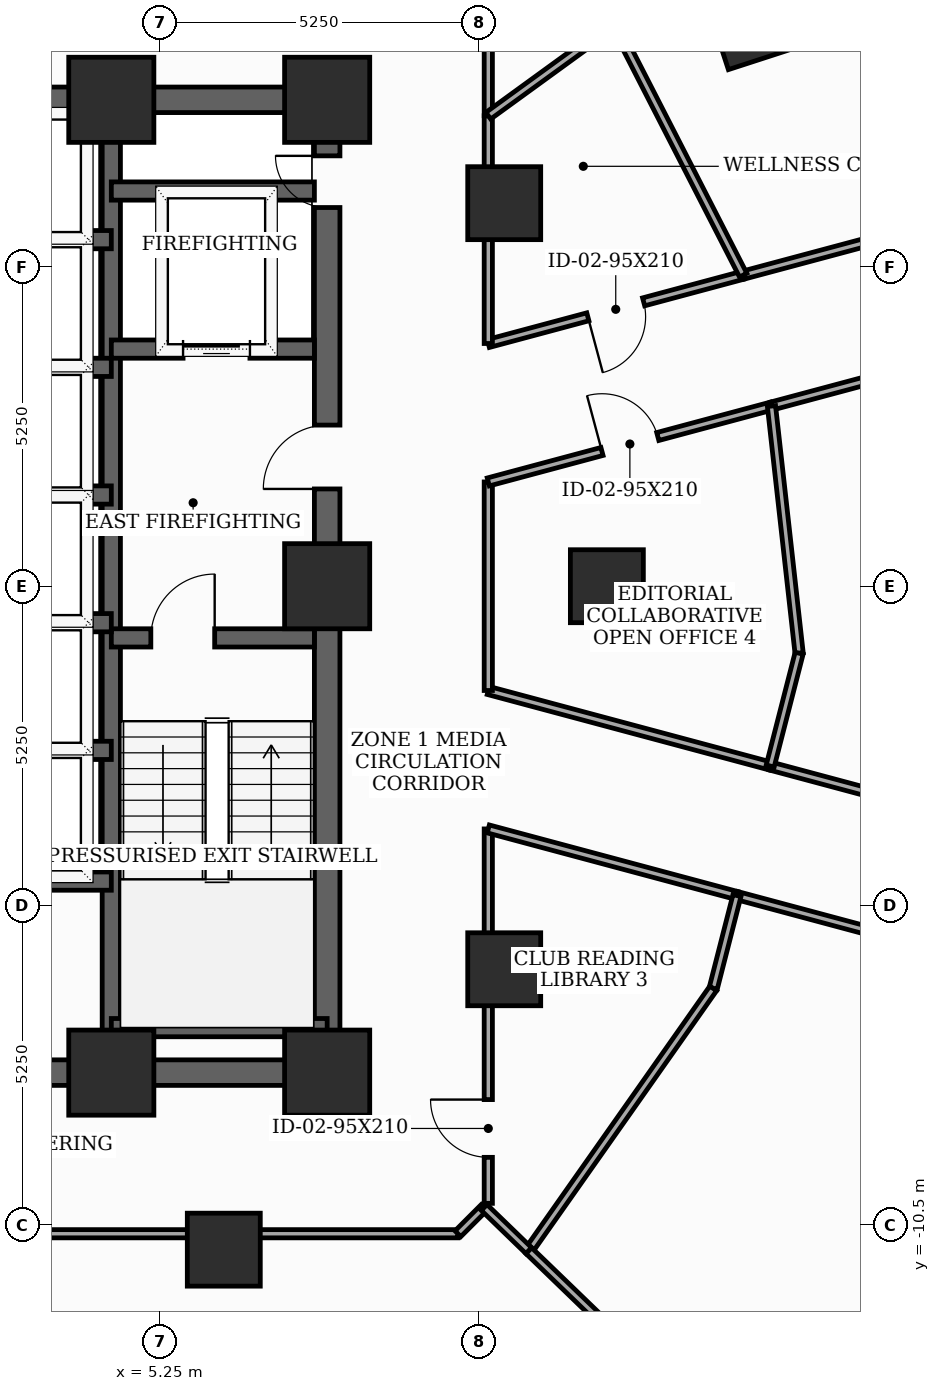
"""IFC4 building model, lengths in metres.
Left out: names, types, materials, properties, quantities, classifications, styles, units other than length and angle.
Written with IfcOpenShell. Run it as: python <this file> out.ifc"""

import sys

from ifc_helpers import new_model, si_unit, direction, frame, frame_2d, origin, origin_2d, place, context, subcontext, project, spatial, rectangle, extrude, element, fill, save


model = new_model("IFC4")
c1 = context("Model", 3, precision=1e-05, world=origin(), true_north=direction((0.0, 1.0)))
c2 = subcontext(c1, "Body", "Model", "MODEL_VIEW")
j1 = project(units=[si_unit("LENGTHUNIT", "METRE"), si_unit("PLANEANGLEUNIT", "RADIAN")], contexts=[c1])
p1 = place(None, origin())
s1 = spatial("IfcSite", under=j1, at=p1, CompositionType="ELEMENT")
p2 = place(p1, origin())
s2 = spatial("IfcBuilding", under=s1, at=p2, CompositionType="ELEMENT")
p3 = place(p2, frame((0.0, 0.0, 108.8)))
s3 = spatial("IfcBuildingStorey", under=s2, at=p3, CompositionType="ELEMENT", Elevation=108.8)
for number, where, z_axis, x_axis in (
    (1, (4.45, -8.0, 0.0), (0.0, 0.0, 1.0), (1.0, 0.0, 0.0)),
    (2, (8.0, -8.0, 0.0), (0.0, 0.0, 1.0), (1.0, 0.0, 0.0)),
    (3, (8.0, 0.0, 0.0), (0.0, 0.0, 1.0), (1.0, 0.0, 0.0)),
    (4, (8.0, 8.0, 0.0), (0.0, 0.0, 1.0), (1.0, 0.0, 0.0)),
    (5, (4.45, 8.0, 0.0), (0.0, 0.0, 1.0), (1.0, 0.0, 0.0)),
):
    element("IfcColumn", number, at=place(p3, frame(where, z_axis=z_axis, x_axis=x_axis)), inside=s3, PredefinedType="COLUMN", context=c2, shape_type="SweptSolid", body=[
        extrude(rectangle(XDim=1.4, YDim=1.4, at=origin_2d()), origin(), (0.0, 0.0, 1.0), 3.7),
    ])
for number, where, z_axis, x_axis in (
    (6, (12.6, 0.0, 0.0), (0.0, 0.0, 1.0), (1.0, 0.0, 0.0)),
    (7, (10.912, 6.3, 0.0), (0.0, 0.0, 1.0), (1.0, 0.0, 0.0)),
    (8, (6.3, -10.912, 0.0), (0.0, 0.0, 1.0), (1.0, 0.0, 0.0)),
    (9, (10.912, -6.3, 0.0), (0.0, 0.0, 1.0), (1.0, 0.0, 0.0)),
    (10, (14.984, 9.252, 0.0), (0.0, 0.0, 1.0), (0.951, 0.309, 0.0)),
):
    element("IfcColumn", number, at=place(p3, frame(where, z_axis=z_axis, x_axis=x_axis)), inside=s3, PredefinedType="COLUMN", context=c2, shape_type="SweptSolid", body=[
        extrude(rectangle(XDim=1.2, YDim=1.2, at=origin_2d()), origin(), (0.0, 0.0, 1.0), 3.7),
    ])
p4 = place(p3, frame((8.0, -8.0, 0.0), z_axis=(0.0, 0.0, 1.0), x_axis=(0.0, 1.0, 0.0)))
e11 = element("IfcWall", 11, at=p4, inside=s3, PredefinedType="SHEAR", context=c2, shape_type="SweptSolid", body=[
    extrude(rectangle(XDim=16.0, YDim=0.42, at=frame_2d((8.0, 0.0))), origin(), (0.0, 0.0, 1.0), 3.5),
])
p5 = place(p4, frame((9.6, 0.0, 0.0)))
e12 = element("IfcOpeningElement", 12, at=p5, cuts=e11, PredefinedType="OPENING", context=c2, shape_type="SweptSolid", body=[
    extrude(rectangle(XDim=1.05, YDim=2.15, at=frame_2d((0.525, 1.075))), frame((0.0, 0.22, 0.0), z_axis=(0.0, -1.0, 0.0), x_axis=(1.0, 0.0, 0.0)), (0.0, 0.0, 1.0), 0.44),
])
p6 = place(p4, frame((14.229, 0.0, 0.0)))
e13 = element("IfcOpeningElement", 13, at=p6, cuts=e11, PredefinedType="OPENING", context=c2, shape_type="SweptSolid", body=[
    extrude(rectangle(XDim=0.85, YDim=2.02, at=frame_2d((0.425, 1.01))), frame((0.0, 0.22, 0.0), z_axis=(0.0, -1.0, 0.0), x_axis=(1.0, 0.0, 0.0)), (0.0, 0.0, 1.0), 0.44),
])
p7 = place(p3, frame((-8.0, -8.0, 0.0), z_axis=(0.0, 0.0, 1.0), x_axis=(1.0, 0.0, 0.0)))
e14 = element("IfcWall", 14, at=p7, inside=s3, PredefinedType="SHEAR", context=c2, shape_type="SweptSolid", body=[
    extrude(rectangle(XDim=16.0, YDim=0.42, at=frame_2d((8.0, 0.0))), origin(), (0.0, 0.0, 1.0), 3.5),
])
p8 = place(p7, frame((4.6, 0.0, 0.0)))
e15 = element("IfcOpeningElement", 15, at=p8, cuts=e14, PredefinedType="OPENING", context=c2, shape_type="SweptSolid", body=[
    extrude(rectangle(XDim=0.95, YDim=2.1, at=frame_2d((0.475, 1.05))), frame((0.0, 0.22, 0.0), z_axis=(0.0, -1.0, 0.0), x_axis=(1.0, 0.0, 0.0)), (0.0, 0.0, 1.0), 0.44),
])
p9 = place(p7, frame((7.52, 0.0, 0.0)))
e16 = element("IfcOpeningElement", 16, at=p9, cuts=e14, PredefinedType="OPENING", context=c2, shape_type="SweptSolid", body=[
    extrude(rectangle(XDim=0.95, YDim=2.1, at=frame_2d((0.475, 1.05))), frame((0.0, 0.22, 0.0), z_axis=(0.0, -1.0, 0.0), x_axis=(1.0, 0.0, 0.0)), (0.0, 0.0, 1.0), 0.44),
])
p10 = place(p7, frame((10.45, 0.0, 0.0)))
e17 = element("IfcOpeningElement", 17, at=p10, cuts=e14, PredefinedType="OPENING", context=c2, shape_type="SweptSolid", body=[
    extrude(rectangle(XDim=0.95, YDim=2.1, at=frame_2d((0.475, 1.05))), frame((0.0, 0.22, 0.0), z_axis=(0.0, -1.0, 0.0), x_axis=(1.0, 0.0, 0.0)), (0.0, 0.0, 1.0), 0.44),
])
p11 = place(p3, frame((-8.0, 8.0, 0.0), z_axis=(0.0, 0.0, 1.0), x_axis=(1.0, 0.0, 0.0)))
e18 = element("IfcWall", 18, at=p11, inside=s3, PredefinedType="SHEAR", context=c2, shape_type="SweptSolid", body=[
    extrude(rectangle(XDim=16.0, YDim=0.42, at=frame_2d((8.0, 0.0))), origin(), (0.0, 0.0, 1.0), 3.5),
])
p12 = place(p11, frame((7.1, 0.0, 0.0)))
e19 = element("IfcOpeningElement", 19, at=p12, cuts=e18, PredefinedType="OPENING", context=c2, shape_type="SweptSolid", body=[
    extrude(rectangle(XDim=1.8, YDim=2.15, at=frame_2d((0.9, 1.075))), frame((0.0, 0.22, 0.0), z_axis=(0.0, -1.0, 0.0), x_axis=(1.0, 0.0, 0.0)), (0.0, 0.0, 1.0), 0.44),
])
p13 = place(p3, frame((4.45, -7.79, 0.0), z_axis=(0.0, 0.0, 1.0), x_axis=(0.0, 1.0, 0.0)))
e20 = element("IfcWall", 20, at=p13, inside=s3, PredefinedType="SHEAR", context=c2, shape_type="SweptSolid", body=[
    extrude(rectangle(XDim=15.58, YDim=0.3, at=frame_2d((7.79, 0.0))), origin(), (0.0, 0.0, 1.0), 3.5),
])
p14 = place(p3, frame((4.45, -0.85, 0.0), z_axis=(0.0, 0.0, 1.0), x_axis=(1.0, 0.0, 0.0)))
e21 = element("IfcWall", 21, at=p14, inside=s3, PredefinedType="SHEAR", context=c2, shape_type="SweptSolid", body=[
    extrude(rectangle(XDim=3.34, YDim=0.3, at=frame_2d((1.67, 0.0))), origin(), (0.0, 0.0, 1.0), 3.5),
])
p15 = place(p14, frame((0.65, 0.0, 0.0)))
e22 = element("IfcOpeningElement", 22, at=p15, cuts=e21, PredefinedType="OPENING", context=c2, shape_type="SweptSolid", body=[
    extrude(rectangle(XDim=1.05, YDim=2.15, at=frame_2d((0.525, 1.075))), frame((0.0, 0.16, 0.0), z_axis=(0.0, -1.0, 0.0), x_axis=(1.0, 0.0, 0.0)), (0.0, 0.0, 1.0), 0.32),
])
p16 = place(p3, frame((4.45, -7.26, 0.0), z_axis=(0.0, 0.0, 1.0), x_axis=(1.0, 0.0, 0.0)))
e23 = element("IfcWall", 23, at=p16, inside=s3, PredefinedType="SHEAR", context=c2, shape_type="SweptSolid", body=[
    extrude(rectangle(XDim=3.55, YDim=0.3, at=frame_2d((1.775, 0.0))), origin(), (0.0, 0.0, 1.0), 3.5),
])
p17 = place(p3, frame((4.45, 3.9, 0.0), z_axis=(0.0, 0.0, 1.0), x_axis=(1.0, 0.0, 0.0)))
e24 = element("IfcWall", 24, at=p17, inside=s3, PredefinedType="SHEAR", context=c2, shape_type="SweptSolid", body=[
    extrude(rectangle(XDim=3.34, YDim=0.3, at=frame_2d((1.67, 0.0))), origin(), (0.0, 0.0, 1.0), 3.5),
])
p18 = place(p17, frame((1.18, 0.0, 0.0)))
e25 = element("IfcOpeningElement", 25, at=p18, cuts=e24, PredefinedType="OPENING", context=c2, shape_type="SweptSolid", body=[
    extrude(rectangle(XDim=1.1, YDim=2.1, at=frame_2d((0.55, 1.05))), frame((0.0, 0.16, 0.0), z_axis=(0.0, -1.0, 0.0), x_axis=(1.0, 0.0, 0.0)), (0.0, 0.0, 1.0), 0.32),
])
p19 = place(p3, frame((4.45, 6.5, 0.0), z_axis=(0.0, 0.0, 1.0), x_axis=(1.0, 0.0, 0.0)))
e26 = element("IfcWall", 26, at=p19, inside=s3, PredefinedType="SHEAR", context=c2, shape_type="SweptSolid", body=[
    extrude(rectangle(XDim=3.34, YDim=0.3, at=frame_2d((1.67, 0.0))), origin(), (0.0, 0.0, 1.0), 3.5),
])
p20 = place(p3, frame((-4.45, -4.85, 0.0), z_axis=(0.0, 0.0, 1.0), x_axis=(1.0, 0.0, 0.0)))
e27 = element("IfcWall", 27, at=p20, inside=s3, PredefinedType="SHEAR", context=c2, shape_type="SweptSolid", body=[
    extrude(rectangle(XDim=8.9, YDim=0.3, at=frame_2d((4.45, 0.0))), origin(), (0.0, 0.0, 1.0), 3.5),
])
for number, where, z_axis, x_axis in (
    (28, (1.68, 1.5, 0.0), (0.0, 0.0, 1.0), (1.0, 0.0, 0.0)),
    (29, (1.68, 3.6, 0.0), (0.0, 0.0, 1.0), (1.0, 0.0, 0.0)),
    (30, (1.68, 5.7, 0.0), (0.0, 0.0, 1.0), (1.0, 0.0, 0.0)),
    (31, (1.68, -2.7, 0.0), (0.0, 0.0, 1.0), (1.0, 0.0, 0.0)),
    (32, (1.68, -0.6, 0.0), (0.0, 0.0, 1.0), (1.0, 0.0, 0.0)),
):
    element("IfcWall", number, at=place(p3, frame(where, z_axis=z_axis, x_axis=x_axis)), inside=s3, PredefinedType="SHEAR", context=c2, shape_type="SweptSolid", body=[
        extrude(rectangle(XDim=2.77, YDim=0.3, at=frame_2d((1.385, 0.0))), origin(), (0.0, 0.0, 1.0), 3.5),
    ])
p21 = place(p3, frame((14.74, -5.088, 0.0), z_axis=(0.0, 0.0, 1.0), x_axis=(0.965895912523, -0.258930659002, 0.0)))
e33 = element("IfcWall", 33, at=p21, inside=s3, PredefinedType="PARTITIONING", context=c2, shape_type="SweptSolid", body=[
    extrude(rectangle(XDim=7.045, YDim=0.135, at=frame_2d((3.522, 0.0))), origin(), (0.0, 0.0, 1.0), 2.935),
])
p22 = place(p3, frame((22.115, -4.787, 0.0), z_axis=(0.0, 0.0, 1.0), x_axis=(-0.965917838763, 0.258848853116, 0.0)))
e34 = element("IfcWall", 34, at=p22, inside=s3, PredefinedType="PARTITIONING", context=c2, shape_type="SweptSolid", body=[
    extrude(rectangle(XDim=7.07, YDim=0.135, at=frame_2d((3.535, 0.0))), origin(), (0.0, 0.0, 1.0), 2.935),
])
p23 = place(p22, frame((3.06, 0.0, 0.0)))
e35 = element("IfcOpeningElement", 35, at=p23, cuts=e34, PredefinedType="OPENING", context=c2, shape_type="SweptSolid", body=[
    extrude(rectangle(XDim=0.95, YDim=2.1, at=frame_2d((0.475, 1.05))), frame((0.0, 0.077, 0.0), z_axis=(0.0, -1.0, 0.0), x_axis=(1.0, 0.0, 0.0)), (0.0, 0.0, 1.0), 0.155),
])
p24 = place(p3, frame((15.307, 2.963, 0.0), z_axis=(0.0, 0.0, 1.0), x_axis=(0.965966165677, 0.258668449501, 0.0)))
e36 = element("IfcWall", 36, at=p24, inside=s3, PredefinedType="PARTITIONING", context=c2, shape_type="SweptSolid", body=[
    extrude(rectangle(XDim=3.248, YDim=0.135, at=frame_2d((1.624, 0.0))), origin(), (0.0, 0.0, 1.0), 3.125),
])
p25 = place(p3, frame((17.875, 5.928, 0.0), z_axis=(0.0, 0.0, 1.0), x_axis=(-0.96597893007, -0.258620777704, 0.0)))
e37 = element("IfcWall", 37, at=p25, inside=s3, PredefinedType="PARTITIONING", context=c2, shape_type="SweptSolid", body=[
    extrude(rectangle(XDim=3.14, YDim=0.135, at=frame_2d((1.57, 0.0))), origin(), (0.0, 0.0, 1.0), 3.125),
])
p26 = place(p3, frame((10.65, -10.15, 0.0), z_axis=(0.0, 0.0, 1.0), x_axis=(0.0, 1.0, 0.0)))
e38 = element("IfcWall", 38, at=p26, inside=s3, PredefinedType="PARTITIONING", context=c2, shape_type="SweptSolid", body=[
    extrude(rectangle(XDim=6.158, YDim=0.135, at=frame_2d((3.079, 0.0))), origin(), (0.0, 0.0, 1.0), 2.785),
])
p27 = place(p26, frame((0.757, 0.0, 0.0)))
e39 = element("IfcOpeningElement", 39, at=p27, cuts=e38, PredefinedType="OPENING", context=c2, shape_type="SweptSolid", body=[
    extrude(rectangle(XDim=0.95, YDim=2.1, at=frame_2d((0.475, 1.05))), frame((0.0, 0.077, 0.0), z_axis=(0.0, -1.0, 0.0), x_axis=(1.0, 0.0, 0.0)), (0.0, 0.0, 1.0), 0.155),
])
p28 = place(p3, frame((10.65, -3.992, 0.0), z_axis=(0.0, 0.0, 1.0), x_axis=(0.965925146235, -0.258821583086, 0.0)))
e40 = element("IfcWall", 40, at=p28, inside=s3, PredefinedType="PARTITIONING", context=c2, shape_type="SweptSolid", body=[
    extrude(rectangle(XDim=4.234, YDim=0.135, at=frame_2d((2.117, 0.0))), origin(), (0.0, 0.0, 1.0), 2.785),
])
p29 = place(p3, frame((15.286, -2.957, 0.0), z_axis=(0.0, 0.0, 1.0), x_axis=(-0.965939651128, 0.258767444588, 0.0)))
e41 = element("IfcWall", 41, at=p29, inside=s3, PredefinedType="PARTITIONING", context=c2, shape_type="SweptSolid", body=[
    extrude(rectangle(XDim=4.8, YDim=0.135, at=frame_2d((2.4, 0.0))), origin(), (0.0, 0.0, 1.0), 2.785),
])
p30 = place(p3, frame((10.65, -1.715, 0.0), z_axis=(0.0, 0.0, 1.0), x_axis=(0.0, 1.0, 0.0)))
e42 = element("IfcWall", 42, at=p30, inside=s3, PredefinedType="PARTITIONING", context=c2, shape_type="SweptSolid", body=[
    extrude(rectangle(XDim=3.43, YDim=0.135, at=frame_2d((1.715, 0.0))), origin(), (0.0, 0.0, 1.0), 2.785),
])
p31 = place(p3, frame((10.65, 1.715, 0.0), z_axis=(0.0, 0.0, 1.0), x_axis=(0.965927482723, 0.258812863129, 0.0)))
e43 = element("IfcWall", 43, at=p31, inside=s3, PredefinedType="PARTITIONING", context=c2, shape_type="SweptSolid", body=[
    extrude(rectangle(XDim=4.821, YDim=0.135, at=frame_2d((2.411, 0.0))), origin(), (0.0, 0.0, 1.0), 2.785),
])
p32 = place(p31, frame((1.936, 0.0, 0.0)))
e44 = element("IfcOpeningElement", 44, at=p32, cuts=e43, PredefinedType="OPENING", context=c2, shape_type="SweptSolid", body=[
    extrude(rectangle(XDim=0.95, YDim=2.1, at=frame_2d((0.475, 1.05))), frame((0.0, 0.077, 0.0), z_axis=(0.0, -1.0, 0.0), x_axis=(1.0, 0.0, 0.0)), (0.0, 0.0, 1.0), 0.155),
])
p33 = place(p3, frame((14.842, 5.116, 0.0), z_axis=(0.0, 0.0, 1.0), x_axis=(-0.965883000332, -0.258978820891, 0.0)))
e45 = element("IfcWall", 45, at=p33, inside=s3, PredefinedType="PARTITIONING", context=c2, shape_type="SweptSolid", body=[
    extrude(rectangle(XDim=4.34, YDim=0.135, at=frame_2d((2.17, 0.0))), origin(), (0.0, 0.0, 1.0), 2.785),
])
p34 = place(p33, frame((1.695, 0.0, 0.0)))
e46 = element("IfcOpeningElement", 46, at=p34, cuts=e45, PredefinedType="OPENING", context=c2, shape_type="SweptSolid", body=[
    extrude(rectangle(XDim=0.95, YDim=2.1, at=frame_2d((0.475, 1.05))), frame((0.0, 0.077, 0.0), z_axis=(0.0, -1.0, 0.0), x_axis=(1.0, 0.0, 0.0)), (0.0, 0.0, 1.0), 0.155),
])
p35 = place(p3, frame((10.65, 3.992, 0.0), z_axis=(0.0, 0.0, 1.0), x_axis=(0.0, 1.0, 0.0)))
e47 = element("IfcWall", 47, at=p35, inside=s3, PredefinedType="PARTITIONING", context=c2, shape_type="SweptSolid", body=[
    extrude(rectangle(XDim=3.746, YDim=0.135, at=frame_2d((1.873, 0.0))), origin(), (0.0, 0.0, 1.0), 2.785),
])
p36 = place(p3, frame((2.264, -10.65, 0.0), z_axis=(0.0, 0.0, 1.0), x_axis=(1.0, 0.0, 0.0)))
e48 = element("IfcWall", 48, at=p36, inside=s3, PredefinedType="PARTITIONING", context=c2, shape_type="SweptSolid", body=[
    extrude(rectangle(XDim=7.886, YDim=0.135, at=frame_2d((3.943, 0.0))), origin(), (0.0, 0.0, 1.0), 2.785),
])
p37 = place(p3, frame((10.15, -10.65, 0.0), z_axis=(0.0, 0.0, 1.0), x_axis=(0.70730655707, 0.706906948845, 0.0)))
e49 = element("IfcWall", 49, at=p37, inside=s3, PredefinedType="PARTITIONING", context=c2, shape_type="SweptSolid", body=[
    extrude(rectangle(XDim=0.611, YDim=0.135, at=frame_2d((0.305, 0.0))), origin(), (0.0, 0.0, 1.0), 3.5),
])
p38 = place(p3, frame((10.65, 7.738, 0.0), z_axis=(0.0, 0.0, 1.0), x_axis=(0.0, 1.0, 0.0)))
e50 = element("IfcWall", 50, at=p38, inside=s3, PredefinedType="PARTITIONING", context=c2, shape_type="SweptSolid", body=[
    extrude(rectangle(XDim=2.412, YDim=0.135, at=frame_2d((1.206, 0.0))), origin(), (0.0, 0.0, 1.0), 3.125),
])
p39 = place(p3, frame((3.778, -17.774, 0.0), z_axis=(0.0, 0.0, 1.0), x_axis=(-0.207917284361, 0.978146411773, 0.0)))
e51 = element("IfcWall", 51, at=p39, inside=s3, PredefinedType="PARTITIONING", context=c2, shape_type="SweptSolid", body=[
    extrude(rectangle(XDim=7.284, YDim=0.115, at=frame_2d((3.642, 0.0))), origin(), (0.0, 0.0, 1.0), 2.785),
])
p40 = place(p39, frame((3.182, 0.0, 0.0)))
e52 = element("IfcOpeningElement", 52, at=p40, cuts=e51, PredefinedType="OPENING", context=c2, shape_type="SweptSolid", body=[
    extrude(rectangle(XDim=0.92, YDim=2.1, at=frame_2d((0.46, 1.05))), frame((0.0, 0.067, 0.0), z_axis=(0.0, -1.0, 0.0), x_axis=(1.0, 0.0, 0.0)), (0.0, 0.0, 1.0), 0.135),
])
p41 = place(p3, frame((14.74, -5.088, 0.0), z_axis=(0.0, 0.0, 1.0), x_axis=(-0.247961711117, -0.968769833252, 0.0)))
e53 = element("IfcWall", 53, at=p41, inside=s3, PredefinedType="PARTITIONING", context=c2, shape_type="SweptSolid", body=[
    extrude(rectangle(XDim=1.576, YDim=0.135, at=frame_2d((0.788, 0.0))), origin(), (0.0, 0.0, 1.0), 3.5),
])
p42 = place(p3, frame((14.349, -6.615, 0.0), z_axis=(0.0, 0.0, 1.0), x_axis=(-0.575468172254, -0.817824175922, 0.0)))
e54 = element("IfcWall", 54, at=p42, inside=s3, PredefinedType="PARTITIONING", context=c2, shape_type="SweptSolid", body=[
    extrude(rectangle(XDim=5.272, YDim=0.135, at=frame_2d((2.636, 0.0))), origin(), (0.0, 0.0, 1.0), 2.785),
])
p43 = place(p3, frame((15.307, 2.963, 0.0), z_axis=(0.0, 0.0, 1.0), x_axis=(0.111256918124, -0.99379167745, 0.0)))
e55 = element("IfcWall", 55, at=p43, inside=s3, PredefinedType="PARTITIONING", context=c2, shape_type="SweptSolid", body=[
    extrude(rectangle(XDim=4.09, YDim=0.135, at=frame_2d((2.045, 0.0))), origin(), (0.0, 0.0, 1.0), 2.785),
])
p44 = place(p3, frame((15.762, -1.102, 0.0), z_axis=(0.0, 0.0, 1.0), x_axis=(-0.248590042538, -0.968608791386, 0.0)))
e56 = element("IfcWall", 56, at=p44, inside=s3, PredefinedType="PARTITIONING", context=c2, shape_type="SweptSolid", body=[
    extrude(rectangle(XDim=1.915, YDim=0.135, at=frame_2d((0.958, 0.0))), origin(), (0.0, 0.0, 1.0), 3.5),
])
p45 = place(p3, frame((12.726, 9.246, 0.0), z_axis=(0.0, 0.0, 1.0), x_axis=(0.455967351564, -0.889996502413, 0.0)))
e57 = element("IfcWall", 57, at=p45, inside=s3, PredefinedType="PARTITIONING", context=c2, shape_type="SweptSolid", body=[
    extrude(rectangle(XDim=4.641, YDim=0.135, at=frame_2d((2.32, 0.0))), origin(), (0.0, 0.0, 1.0), 2.785),
])
p46 = place(p3, frame((11.315, -10.927, 0.0), z_axis=(0.0, 0.0, 1.0), x_axis=(0.719365057957, -0.694632214478, 0.0)))
e58 = element("IfcWall", 58, at=p46, inside=s3, PredefinedType="PARTITIONING", context=c2, shape_type="SweptSolid", body=[
    extrude(rectangle(XDim=4.738, YDim=0.135, at=frame_2d((2.369, 0.0))), origin(), (0.0, 0.0, 1.0), 2.935),
])
p47 = place(p3, frame((10.582, -10.218, 0.0), z_axis=(0.0, 0.0, 1.0), x_axis=(0.718741071219, -0.695277838381, 0.0)))
e59 = element("IfcWall", 59, at=p47, inside=s3, PredefinedType="PARTITIONING", context=c2, shape_type="SweptSolid", body=[
    extrude(rectangle(XDim=1.02, YDim=0.135, at=frame_2d((0.51, 0.0))), origin(), (0.0, 0.0, 1.0), 3.5),
])
p48 = place(p3, frame((12.726, 9.246, 0.0), z_axis=(0.0, 0.0, 1.0), x_axis=(-0.80908565166, -0.587690742039, 0.0)))
e60 = element("IfcWall", 60, at=p48, inside=s3, PredefinedType="PARTITIONING", context=c2, shape_type="SweptSolid", body=[
    extrude(rectangle(XDim=2.566, YDim=0.135, at=frame_2d((1.283, 0.0))), origin(), (0.0, 0.0, 1.0), 3.125),
])
p49 = place(p5, origin())
e61 = element("IfcDoor", 61, at=p49, inside=s3, OperationType="SINGLE_SWING_LEFT", PredefinedType="DOOR", context=c2, shape_type="SweptSolid", body=[
    extrude(rectangle(XDim=1.05, YDim=2.15, at=frame_2d((0.525, 1.075))), frame((0.0, 0.025, 0.0), z_axis=(0.0, -1.0, 0.0), x_axis=(1.0, 0.0, 0.0)), (0.0, 0.0, 1.0), 0.05),
])
fill(e12, e61)
p50 = place(p6, origin())
e62 = element("IfcDoor", 62, at=p50, inside=s3, OperationType="SINGLE_SWING_RIGHT", PredefinedType="TRAPDOOR", context=c2, shape_type="SweptSolid", body=[
    extrude(rectangle(XDim=0.85, YDim=2.02, at=frame_2d((0.425, 1.01))), frame((0.0, 0.025, 0.0), z_axis=(0.0, -1.0, 0.0), x_axis=(1.0, 0.0, 0.0)), (0.0, 0.0, 1.0), 0.05),
])
fill(e13, e62)
p51 = place(p15, origin())
e63 = element("IfcDoor", 63, at=p51, inside=s3, OperationType="SINGLE_SWING_RIGHT", PredefinedType="DOOR", context=c2, shape_type="SweptSolid", body=[
    extrude(rectangle(XDim=1.05, YDim=2.15, at=frame_2d((0.525, 1.075))), frame((0.0, 0.025, 0.0), z_axis=(0.0, -1.0, 0.0), x_axis=(1.0, 0.0, 0.0)), (0.0, 0.0, 1.0), 0.05),
])
fill(e22, e63)
p52 = place(p18, origin())
e64 = element("IfcDoor", 64, at=p52, inside=s3, OperationType="SLIDING_TO_LEFT", PredefinedType="DOOR", context=c2, shape_type="SweptSolid", body=[
    extrude(rectangle(XDim=1.1, YDim=2.1, at=frame_2d((0.55, 1.05))), frame((0.0, 0.025, 0.0), z_axis=(0.0, -1.0, 0.0), x_axis=(1.0, 0.0, 0.0)), (0.0, 0.0, 1.0), 0.05),
])
fill(e25, e64)
p53 = place(p27, origin())
e65 = element("IfcDoor", 65, at=p53, inside=s3, OperationType="SINGLE_SWING_RIGHT", PredefinedType="DOOR", context=c2, shape_type="SweptSolid", body=[
    extrude(rectangle(XDim=0.95, YDim=2.1, at=frame_2d((0.475, 1.05))), frame((0.0, 0.025, 0.0), z_axis=(0.0, -1.0, 0.0), x_axis=(1.0, 0.0, 0.0)), (0.0, 0.0, 1.0), 0.05),
])
fill(e39, e65)
p54 = place(p32, origin())
e66 = element("IfcDoor", 66, at=p54, inside=s3, OperationType="SINGLE_SWING_LEFT", PredefinedType="DOOR", context=c2, shape_type="SweptSolid", body=[
    extrude(rectangle(XDim=0.95, YDim=2.1, at=frame_2d((0.475, 1.05))), frame((0.0, 0.025, 0.0), z_axis=(0.0, -1.0, 0.0), x_axis=(1.0, 0.0, 0.0)), (0.0, 0.0, 1.0), 0.05),
])
fill(e44, e66)
p55 = place(p34, origin())
e67 = element("IfcDoor", 67, at=p55, inside=s3, OperationType="SINGLE_SWING_RIGHT", PredefinedType="DOOR", context=c2, shape_type="SweptSolid", body=[
    extrude(rectangle(XDim=0.95, YDim=2.1, at=frame_2d((0.475, 1.05))), frame((0.0, 0.025, 0.0), z_axis=(0.0, -1.0, 0.0), x_axis=(1.0, 0.0, 0.0)), (0.0, 0.0, 1.0), 0.05),
])
fill(e46, e67)
save(model, sys.argv[1])
